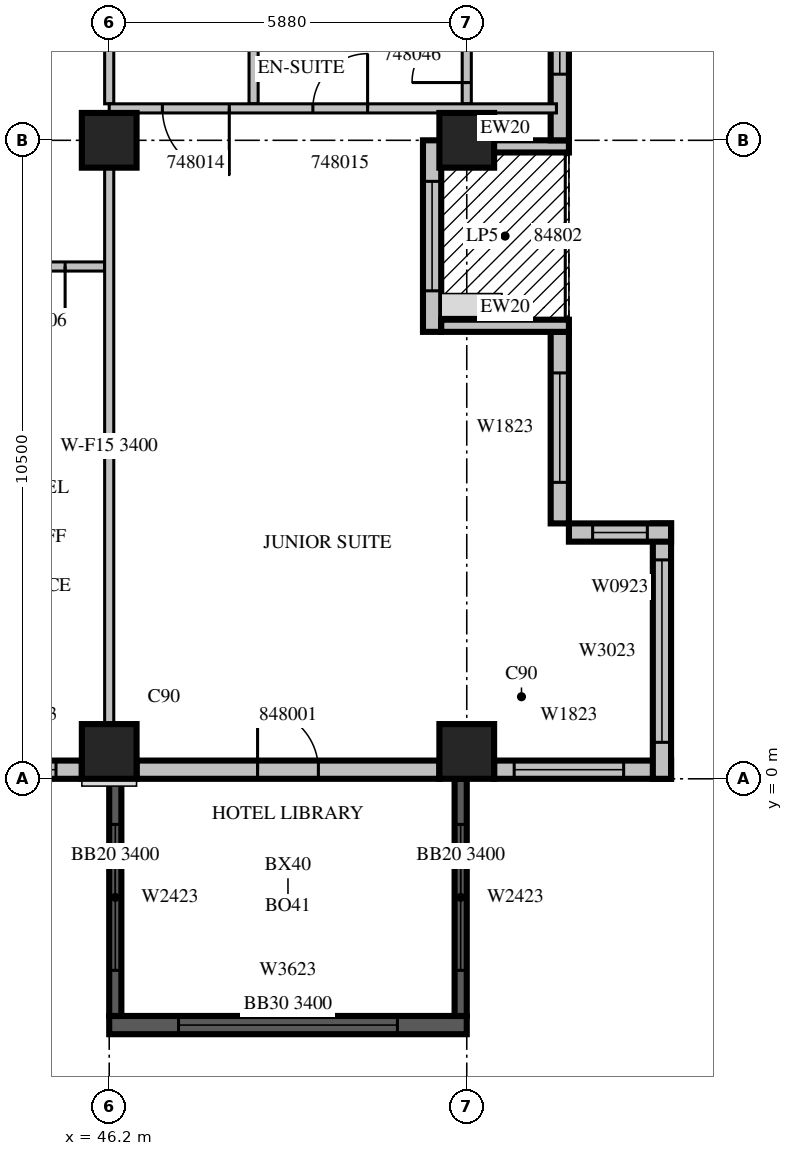
"""IFC4 building model, lengths in metres.
Left out: names, types, materials, properties, quantities, classifications, styles, units other than length and angle.
Written with IfcOpenShell. Run it as: python <this file> out.ifc"""

import sys

from ifc_helpers import new_model, si_unit, direction, frame, frame_2d, origin, origin_2d, place, context, subcontext, project, spatial, rectangle, extrude, source, transform, mapped, element, fill, save


model = new_model("IFC4")
c1 = context("Model", 3, precision=1e-05, world=origin(), true_north=direction((0.0, 1.0)))
c2 = subcontext(c1, "Body", "Model", "MODEL_VIEW")
j1 = project(units=[si_unit("LENGTHUNIT", "METRE"), si_unit("PLANEANGLEUNIT", "RADIAN")], contexts=[c1])
p1 = place(None, origin())
s1 = spatial("IfcSite", under=j1, at=p1, CompositionType="ELEMENT")
p2 = place(p1, origin())
s2 = spatial("IfcBuilding", under=s1, at=p2, CompositionType="ELEMENT")
p3 = place(p2, frame((0.0, 0.0, 215.8)))
s3 = spatial("IfcBuildingStorey", under=s2, at=p3, CompositionType="ELEMENT", Elevation=215.8)
m1 = source(origin(), c2, "Body", "SweptSolid", [
    extrude(rectangle(XDim=0.9, YDim=0.9, at=origin_2d()), origin(), (0.0, 0.0, 1.0), 3.8),
])
for number, where, z_axis, x_axis in (
    (1, (46.2, 0.45, 0.0), (0.0, 0.0, 1.0), (1.0, 0.0, 0.0)),
    (2, (52.08, 0.45, 0.0), (0.0, 0.0, 1.0), (1.0, 0.0, 0.0)),
    (3, (46.2, 10.5, 0.0), (0.0, 0.0, 1.0), (1.0, 0.0, 0.0)),
    (4, (52.08, 10.5, 0.0), (0.0, 0.0, 1.0), (1.0, 0.0, 0.0)),
):
    element("IfcColumn", number, at=place(p3, frame(where, z_axis=z_axis, x_axis=x_axis)), inside=s3, PredefinedType="COLUMN", context=c2, shape_type="MappedRepresentation", body=[
        mapped(m1, transform((0.0, 0.0, 0.0), scale=1.0)),
    ])
m2 = source(origin(), c2, "Body", "SweptSolid", [
    extrude(rectangle(XDim=5.88, YDim=0.3, at=frame_2d((2.94, 0.0))), origin(), (0.0, 0.0, 1.0), 3.4),
])
p4 = place(p3, frame((46.2, -4.05, 0.0), z_axis=(0.0, 0.0, 1.0), x_axis=(1.0, 0.0, 0.0)))
e5 = element("IfcWall", 5, at=p4, inside=s3, PredefinedType="SOLIDWALL", context=c2, shape_type="MappedRepresentation", body=[
    mapped(m2, transform((0.0, 0.0, 0.0), scale=1.0)),
])
m3 = source(origin(), c2, "Body", "SweptSolid", [
    extrude(rectangle(XDim=3.6, YDim=2.3, at=frame_2d((1.8, 1.15))), frame((0.0, 0.16, 0.0), z_axis=(0.0, -1.0, 0.0), x_axis=(1.0, 0.0, 0.0)), (0.0, 0.0, 1.0), 0.32),
])
p5 = place(p4, frame((1.14, 0.0, 0.6)))
e6 = element("IfcOpeningElement", 6, at=p5, cuts=e5, PredefinedType="OPENING", context=c2, shape_type="MappedRepresentation", body=[
    mapped(m3, transform((0.0, 0.0, 0.0), scale=1.0)),
])
m4 = source(origin(), c2, "Body", "SweptSolid", [
    extrude(rectangle(XDim=3.9, YDim=0.2, at=frame_2d((1.95, 0.0))), origin(), (0.0, 0.0, 1.0), 3.4),
])
p6 = place(p3, frame((46.3, 0.0, 0.0), z_axis=(0.0, 0.0, 1.0), x_axis=(0.0, -1.0, 0.0)))
e7 = element("IfcWall", 7, at=p6, inside=s3, PredefinedType="SOLIDWALL", context=c2, shape_type="MappedRepresentation", body=[
    mapped(m4, transform((0.0, 0.0, 0.0), scale=1.0)),
])
m5 = source(origin(), c2, "Body", "SweptSolid", [
    extrude(rectangle(XDim=2.4, YDim=2.3, at=frame_2d((1.2, 1.15))), frame((0.0, 0.11, 0.0), z_axis=(0.0, -1.0, 0.0), x_axis=(1.0, 0.0, 0.0)), (0.0, 0.0, 1.0), 0.22),
])
p7 = place(p6, frame((0.75, 0.0, 0.6)))
e8 = element("IfcOpeningElement", 8, at=p7, cuts=e7, PredefinedType="OPENING", context=c2, shape_type="MappedRepresentation", body=[
    mapped(m5, transform((0.0, 0.0, 0.0), scale=1.0)),
])
p8 = place(p3, frame((51.98, 0.0, 0.0), z_axis=(0.0, 0.0, 1.0), x_axis=(0.0, -1.0, 0.0)))
e9 = element("IfcWall", 9, at=p8, inside=s3, PredefinedType="SOLIDWALL", context=c2, shape_type="MappedRepresentation", body=[
    mapped(m4, transform((0.0, 0.0, 0.0), scale=1.0)),
])
p9 = place(p8, frame((0.75, 0.0, 0.6)))
e10 = element("IfcOpeningElement", 10, at=p9, cuts=e9, PredefinedType="OPENING", context=c2, shape_type="MappedRepresentation", body=[
    mapped(m5, transform((0.0, 0.0, 0.0), scale=1.0)),
])
m6 = source(origin(), c2, "Body", "SweptSolid", [
    extrude(rectangle(XDim=1.75, YDim=0.3, at=frame_2d((0.875, 0.0))), origin(), (0.0, 0.0, 1.0), 3.4),
])
p10 = place(p3, frame((44.0, 0.15, 0.0), z_axis=(0.0, 0.0, 1.0), x_axis=(1.0, 0.0, 0.0)))
e11 = element("IfcWall", 11, at=p10, inside=s3, PredefinedType="STANDARD", context=c2, shape_type="MappedRepresentation", body=[
    mapped(m6, transform((0.0, 0.0, 0.0), scale=1.0)),
])
m7 = source(origin(), c2, "Body", "SweptSolid", [
    extrude(rectangle(XDim=0.9, YDim=2.3, at=frame_2d((0.45, 1.15))), frame((0.0, 0.16, 0.0), z_axis=(0.0, -1.0, 0.0), x_axis=(1.0, 0.0, 0.0)), (0.0, 0.0, 1.0), 0.32),
])
p11 = place(p10, frame((0.425, 0.0, 0.6)))
e12 = element("IfcOpeningElement", 12, at=p11, cuts=e11, PredefinedType="OPENING", context=c2, shape_type="MappedRepresentation", body=[
    mapped(m7, transform((0.0, 0.0, 0.0), scale=1.0)),
])
m8 = source(origin(), c2, "Body", "SweptSolid", [
    extrude(rectangle(XDim=4.98, YDim=0.3, at=frame_2d((2.49, 0.0))), origin(), (0.0, 0.0, 1.0), 3.4),
])
p12 = place(p3, frame((46.65, 0.15, 0.0), z_axis=(0.0, 0.0, 1.0), x_axis=(1.0, 0.0, 0.0)))
e13 = element("IfcWall", 13, at=p12, inside=s3, PredefinedType="STANDARD", context=c2, shape_type="MappedRepresentation", body=[
    mapped(m8, transform((0.0, 0.0, 0.0), scale=1.0)),
])
m9 = source(origin(), c2, "Body", "SweptSolid", [
    extrude(rectangle(XDim=1.0, YDim=2.1, at=frame_2d((0.5, 1.05))), frame((0.0, 0.16, 0.0), z_axis=(0.0, -1.0, 0.0), x_axis=(1.0, 0.0, 0.0)), (0.0, 0.0, 1.0), 0.32),
])
p13 = place(p12, frame((1.99, 0.0, 0.0)))
e14 = element("IfcOpeningElement", 14, at=p13, cuts=e13, PredefinedType="OPENING", context=c2, shape_type="MappedRepresentation", body=[
    mapped(m9, transform((0.0, 0.0, 0.0), scale=1.0)),
])
m10 = source(origin(), c2, "Body", "SweptSolid", [
    extrude(rectangle(XDim=2.91, YDim=0.3, at=frame_2d((1.455, 0.0))), origin(), (0.0, 0.0, 1.0), 3.4),
])
p14 = place(p3, frame((52.53, 0.15, 0.0), z_axis=(0.0, 0.0, 1.0), x_axis=(1.0, 0.0, 0.0)))
e15 = element("IfcWall", 15, at=p14, inside=s3, PredefinedType="STANDARD", context=c2, shape_type="MappedRepresentation", body=[
    mapped(m10, transform((0.0, 0.0, 0.0), scale=1.0)),
])
m11 = source(origin(), c2, "Body", "SweptSolid", [
    extrude(rectangle(XDim=1.8, YDim=2.3, at=frame_2d((0.9, 1.15))), frame((0.0, 0.16, 0.0), z_axis=(0.0, -1.0, 0.0), x_axis=(1.0, 0.0, 0.0)), (0.0, 0.0, 1.0), 0.32),
])
p15 = place(p14, frame((0.33, 0.0, 0.6)))
e16 = element("IfcOpeningElement", 16, at=p15, cuts=e15, PredefinedType="OPENING", context=c2, shape_type="MappedRepresentation", body=[
    mapped(m11, transform((0.0, 0.0, 0.0), scale=1.0)),
])
m12 = source(origin(), c2, "Body", "SweptSolid", [
    extrude(rectangle(XDim=4.2, YDim=0.3, at=frame_2d((2.1, 0.0))), origin(), (0.0, 0.0, 1.0), 3.4),
])
p16 = place(p3, frame((55.29, 0.0, 0.0), z_axis=(0.0, 0.0, 1.0), x_axis=(0.0, 1.0, 0.0)))
e17 = element("IfcWall", 17, at=p16, inside=s3, PredefinedType="STANDARD", context=c2, shape_type="MappedRepresentation", body=[
    mapped(m12, transform((0.0, 0.0, 0.0), scale=1.0)),
])
m13 = source(origin(), c2, "Body", "SweptSolid", [
    extrude(rectangle(XDim=3.0, YDim=2.3, at=frame_2d((1.5, 1.15))), frame((0.0, 0.16, 0.0), z_axis=(0.0, -1.0, 0.0), x_axis=(1.0, 0.0, 0.0)), (0.0, 0.0, 1.0), 0.32),
])
p17 = place(p16, frame((0.6, 0.0, 0.6)))
e18 = element("IfcOpeningElement", 18, at=p17, cuts=e17, PredefinedType="OPENING", context=c2, shape_type="MappedRepresentation", body=[
    mapped(m13, transform((0.0, 0.0, 0.0), scale=1.0)),
])
m14 = source(origin(), c2, "Body", "SweptSolid", [
    extrude(rectangle(XDim=1.68, YDim=0.3, at=frame_2d((0.84, 0.0))), origin(), (0.0, 0.0, 1.0), 3.4),
])
p18 = place(p3, frame((55.44, 4.05, 0.0), z_axis=(0.0, 0.0, 1.0), x_axis=(-1.0, 0.0, 0.0)))
e19 = element("IfcWall", 19, at=p18, inside=s3, PredefinedType="STANDARD", context=c2, shape_type="MappedRepresentation", body=[
    mapped(m14, transform((0.0, 0.0, 0.0), scale=1.0)),
])
p19 = place(p18, frame((0.39, 0.0, 0.6)))
e20 = element("IfcOpeningElement", 20, at=p19, cuts=e19, PredefinedType="OPENING", context=c2, shape_type="MappedRepresentation", body=[
    mapped(m7, transform((0.0, 0.0, 0.0), scale=1.0)),
])
m15 = source(origin(), c2, "Body", "SweptSolid", [
    extrude(rectangle(XDim=3.15, YDim=0.3, at=frame_2d((1.575, 0.0))), origin(), (0.0, 0.0, 1.0), 3.4),
])
p20 = place(p3, frame((53.61, 4.2, 0.0), z_axis=(0.0, 0.0, 1.0), x_axis=(0.0, 1.0, 0.0)))
e21 = element("IfcWall", 21, at=p20, inside=s3, PredefinedType="STANDARD", context=c2, shape_type="MappedRepresentation", body=[
    mapped(m15, transform((0.0, 0.0, 0.0), scale=1.0)),
])
p21 = place(p20, frame((0.675, 0.0, 0.6)))
e22 = element("IfcOpeningElement", 22, at=p21, cuts=e21, PredefinedType="OPENING", context=c2, shape_type="MappedRepresentation", body=[
    mapped(m11, transform((0.0, 0.0, 0.0), scale=1.0)),
])
p22 = place(p3, frame((51.51, 7.35, 0.0), z_axis=(0.0, 0.0, 1.0), x_axis=(0.0, 1.0, 0.0)))
e23 = element("IfcWall", 23, at=p22, inside=s3, PredefinedType="STANDARD", context=c2, shape_type="MappedRepresentation", body=[
    mapped(m15, transform((0.0, 0.0, 0.0), scale=1.0)),
])
m16 = source(origin(), c2, "Body", "SweptSolid", [
    extrude(rectangle(XDim=1.8, YDim=2.4, at=frame_2d((0.9, 1.2))), frame((0.0, 0.16, 0.0), z_axis=(0.0, -1.0, 0.0), x_axis=(1.0, 0.0, 0.0)), (0.0, 0.0, 1.0), 0.32),
])
p23 = place(p22, frame((0.675, 0.0, 0.0)))
e24 = element("IfcOpeningElement", 24, at=p23, cuts=e23, PredefinedType="OPENING", context=c2, shape_type="MappedRepresentation", body=[
    mapped(m16, transform((0.0, 0.0, 0.0), scale=1.0)),
])
p24 = place(p3, frame((53.76, 7.45, 0.0), z_axis=(0.0, 0.0, 1.0), x_axis=(-1.0, 0.0, 0.0)))
e25 = element("IfcWall", 25, at=p24, inside=s3, PredefinedType="STANDARD", context=c2, shape_type="SweptSolid", body=[
    extrude(rectangle(XDim=2.1, YDim=0.2, at=frame_2d((1.05, 0.0))), origin(), (0.0, 0.0, 1.0), 3.4),
])
m17 = source(origin(), c2, "Body", "SweptSolid", [
    extrude(rectangle(XDim=2.1, YDim=0.2, at=frame_2d((1.05, 0.0))), origin(), (0.0, 0.0, 1.0), 3.4),
])
p25 = place(p3, frame((53.76, 10.4, 0.0), z_axis=(0.0, 0.0, 1.0), x_axis=(-1.0, 0.0, 0.0)))
e26 = element("IfcWall", 26, at=p25, inside=s3, PredefinedType="STANDARD", context=c2, shape_type="MappedRepresentation", body=[
    mapped(m17, transform((0.0, 0.0, 0.0), scale=1.0)),
])
m18 = source(origin(), c2, "Body", "SweptSolid", [
    extrude(rectangle(XDim=6.75, YDim=0.3, at=frame_2d((3.375, 0.0))), origin(), (0.0, 0.0, 1.0), 3.4),
])
p26 = place(p3, frame((53.61, 10.5, 0.0), z_axis=(0.0, 0.0, 1.0), x_axis=(0.0, 1.0, 0.0)))
e27 = element("IfcWall", 27, at=p26, inside=s3, PredefinedType="STANDARD", context=c2, shape_type="MappedRepresentation", body=[
    mapped(m18, transform((0.0, 0.0, 0.0), scale=1.0)),
])
m19 = source(origin(), c2, "Body", "SweptSolid", [
    extrude(rectangle(XDim=1.2, YDim=2.3, at=frame_2d((0.6, 1.15))), frame((0.0, 0.16, 0.0), z_axis=(0.0, -1.0, 0.0), x_axis=(1.0, 0.0, 0.0)), (0.0, 0.0, 1.0), 0.32),
])
p27 = place(p26, frame((1.087, 0.0, 0.6)))
e28 = element("IfcOpeningElement", 28, at=p27, cuts=e27, PredefinedType="OPENING", context=c2, shape_type="MappedRepresentation", body=[
    mapped(m19, transform((0.0, 0.0, 0.0), scale=1.0)),
])
p28 = place(p26, frame((4.606, 0.0, 0.6)))
e29 = element("IfcOpeningElement", 29, at=p28, cuts=e27, PredefinedType="OPENING", context=c2, shape_type="MappedRepresentation", body=[
    mapped(m19, transform((0.0, 0.0, 0.0), scale=1.0)),
])
m20 = source(origin(), c2, "Body", "SweptSolid", [
    extrude(rectangle(XDim=2.2, YDim=0.15, at=frame_2d((1.1, 0.0))), origin(), (0.0, 0.0, 1.0), 3.4),
])
p29 = place(p3, frame((46.125, 8.425, 0.0), z_axis=(0.0, 0.0, 1.0), x_axis=(-1.0, 0.0, 0.0)))
e30 = element("IfcWall", 30, at=p29, inside=s3, PredefinedType="PARTITIONING", context=c2, shape_type="MappedRepresentation", body=[
    mapped(m20, transform((0.0, 0.0, 0.0), scale=1.0)),
])
m21 = source(origin(), c2, "Body", "SweptSolid", [
    extrude(rectangle(XDim=0.9, YDim=2.1, at=frame_2d((0.45, 1.05))), frame((0.0, 0.085, 0.0), z_axis=(0.0, -1.0, 0.0), x_axis=(1.0, 0.0, 0.0)), (0.0, 0.0, 1.0), 0.17),
])
p30 = place(p29, frame((0.65, 0.0, 0.0)))
e31 = element("IfcOpeningElement", 31, at=p30, cuts=e30, PredefinedType="OPENING", context=c2, shape_type="MappedRepresentation", body=[
    mapped(m21, transform((0.0, 0.0, 0.0), scale=1.0)),
])
m22 = source(origin(), c2, "Body", "SweptSolid", [
    extrude(rectangle(XDim=3.6, YDim=0.15, at=frame_2d((1.8, 0.0))), origin(), (0.0, 0.0, 1.0), 3.4),
])
p31 = place(p3, frame((48.574, 11.1, 0.0), z_axis=(0.0, 0.0, 1.0), x_axis=(0.0, 1.0, 0.0)))
e32 = element("IfcWall", 32, at=p31, inside=s3, PredefinedType="PARTITIONING", context=c2, shape_type="MappedRepresentation", body=[
    mapped(m22, transform((0.0, 0.0, 0.0), scale=1.0)),
])
p32 = place(p3, frame((52.08, 11.1, 0.0), z_axis=(0.0, 0.0, 1.0), x_axis=(0.0, 1.0, 0.0)))
e33 = element("IfcWall", 33, at=p32, inside=s3, PredefinedType="PARTITIONING", context=c2, shape_type="MappedRepresentation", body=[
    mapped(m22, transform((0.0, 0.0, 0.0), scale=1.0)),
])
p33 = place(p32, frame((1.35, 0.0, 0.0)))
e34 = element("IfcOpeningElement", 34, at=p33, cuts=e33, PredefinedType="OPENING", context=c2, shape_type="MappedRepresentation", body=[
    mapped(m21, transform((0.0, 0.0, 0.0), scale=1.0)),
])
p34 = place(p32, frame((2.35, 0.0, 0.0)))
e35 = element("IfcOpeningElement", 35, at=p34, cuts=e33, PredefinedType="OPENING", context=c2, shape_type="MappedRepresentation", body=[
    mapped(m21, transform((0.0, 0.0, 0.0), scale=1.0)),
])
p35 = place(p32, frame((0.35, 0.0, 0.0)))
e36 = element("IfcOpeningElement", 36, at=p35, cuts=e33, PredefinedType="OPENING", context=c2, shape_type="MappedRepresentation", body=[
    mapped(m21, transform((0.0, 0.0, 0.0), scale=1.0)),
])
m23 = source(origin(), c2, "Body", "SweptSolid", [
    extrude(rectangle(XDim=9.152, YDim=0.15, at=frame_2d((4.576, 0.0))), origin(), (0.0, 0.0, 1.0), 3.4),
])
p36 = place(p3, frame((46.2, 0.899, 0.0), z_axis=(0.0, 0.0, 1.0), x_axis=(0.0, 1.0, 0.0)))
e37 = element("IfcWall", 37, at=p36, inside=s3, PredefinedType="PARTITIONING", context=c2, shape_type="MappedRepresentation", body=[
    mapped(m23, transform((0.0, 0.0, 0.0), scale=1.0)),
])
p37 = place(p3, frame((46.2, 11.1, 0.0), z_axis=(0.0, 0.0, 1.0), x_axis=(0.0, 1.0, 0.0)))
e38 = element("IfcWall", 38, at=p37, inside=s3, PredefinedType="PARTITIONING", context=c2, shape_type="MappedRepresentation", body=[
    mapped(m22, transform((0.0, 0.0, 0.0), scale=1.0)),
])
m24 = source(origin(), c2, "Body", "SweptSolid", [
    extrude(rectangle(XDim=7.355, YDim=0.15, at=frame_2d((3.678, 0.0))), origin(), (0.0, 0.0, 1.0), 3.4),
])
p38 = place(p3, frame((53.555, 11.025, 0.0), z_axis=(0.0, 0.0, 1.0), x_axis=(-1.0, 0.0, 0.0)))
e39 = element("IfcWall", 39, at=p38, inside=s3, PredefinedType="PARTITIONING", context=c2, shape_type="MappedRepresentation", body=[
    mapped(m24, transform((0.0, 0.0, 0.0), scale=1.0)),
])
m25 = source(origin(), c2, "Body", "SweptSolid", [
    extrude(rectangle(XDim=1.1, YDim=2.1, at=frame_2d((0.55, 1.05))), frame((0.0, 0.085, 0.0), z_axis=(0.0, -1.0, 0.0), x_axis=(1.0, 0.0, 0.0)), (0.0, 0.0, 1.0), 0.17),
])
p39 = place(p38, frame((5.38, 0.0, 0.0)))
e40 = element("IfcOpeningElement", 40, at=p39, cuts=e39, PredefinedType="OPENING", context=c2, shape_type="MappedRepresentation", body=[
    mapped(m25, transform((0.0, 0.0, 0.0), scale=1.0)),
])
p40 = place(p38, frame((3.106, 0.0, 0.0)))
e41 = element("IfcOpeningElement", 41, at=p40, cuts=e39, PredefinedType="OPENING", context=c2, shape_type="MappedRepresentation", body=[
    mapped(m21, transform((0.0, 0.0, 0.0), scale=1.0)),
])
m26 = source(origin(), c2, "Body", "SweptSolid", [
    extrude(rectangle(XDim=3.6, YDim=2.3, at=frame_2d((1.8, 1.15))), frame((0.0, 0.03, 0.0), z_axis=(0.0, -1.0, 0.0), x_axis=(1.0, 0.0, 0.0)), (0.0, 0.0, 1.0), 0.06),
])
p41 = place(p5, origin())
e42 = element("IfcWindow", 42, at=p41, inside=s3, PartitioningType="SINGLE_PANEL", PredefinedType="WINDOW", context=c2, shape_type="MappedRepresentation", body=[
    mapped(m26, transform((0.0, 0.0, 0.0), scale=1.0)),
])
fill(e6, e42)
m27 = source(origin(), c2, "Body", "SweptSolid", [
    extrude(rectangle(XDim=2.4, YDim=2.3, at=frame_2d((1.2, 1.15))), frame((0.0, 0.03, 0.0), z_axis=(0.0, -1.0, 0.0), x_axis=(1.0, 0.0, 0.0)), (0.0, 0.0, 1.0), 0.06),
])
p42 = place(p7, origin())
e43 = element("IfcWindow", 43, at=p42, inside=s3, PartitioningType="SINGLE_PANEL", PredefinedType="WINDOW", context=c2, shape_type="MappedRepresentation", body=[
    mapped(m27, transform((0.0, 0.0, 0.0), scale=1.0)),
])
fill(e8, e43)
p43 = place(p9, origin())
e44 = element("IfcWindow", 44, at=p43, inside=s3, PartitioningType="SINGLE_PANEL", PredefinedType="WINDOW", context=c2, shape_type="MappedRepresentation", body=[
    mapped(m27, transform((0.0, 0.0, 0.0), scale=1.0)),
])
fill(e10, e44)
m28 = source(origin(), c2, "Body", "SweptSolid", [
    extrude(rectangle(XDim=0.9, YDim=2.3, at=frame_2d((0.45, 1.15))), frame((0.0, 0.03, 0.0), z_axis=(0.0, -1.0, 0.0), x_axis=(1.0, 0.0, 0.0)), (0.0, 0.0, 1.0), 0.06),
])
p44 = place(p11, origin())
e45 = element("IfcWindow", 45, at=p44, inside=s3, PartitioningType="SINGLE_PANEL", PredefinedType="WINDOW", context=c2, shape_type="MappedRepresentation", body=[
    mapped(m28, transform((0.0, 0.0, 0.0), scale=1.0)),
])
fill(e12, e45)
m29 = source(origin(), c2, "Body", "SweptSolid", [
    extrude(rectangle(XDim=1.8, YDim=2.3, at=frame_2d((0.9, 1.15))), frame((0.0, 0.03, 0.0), z_axis=(0.0, -1.0, 0.0), x_axis=(1.0, 0.0, 0.0)), (0.0, 0.0, 1.0), 0.06),
])
p45 = place(p15, origin())
e46 = element("IfcWindow", 46, at=p45, inside=s3, PartitioningType="SINGLE_PANEL", PredefinedType="WINDOW", context=c2, shape_type="MappedRepresentation", body=[
    mapped(m29, transform((0.0, 0.0, 0.0), scale=1.0)),
])
fill(e16, e46)
m30 = source(origin(), c2, "Body", "SweptSolid", [
    extrude(rectangle(XDim=3.0, YDim=2.3, at=frame_2d((1.5, 1.15))), frame((0.0, 0.03, 0.0), z_axis=(0.0, -1.0, 0.0), x_axis=(1.0, 0.0, 0.0)), (0.0, 0.0, 1.0), 0.06),
])
p46 = place(p17, origin())
e47 = element("IfcWindow", 47, at=p46, inside=s3, PartitioningType="SINGLE_PANEL", PredefinedType="WINDOW", context=c2, shape_type="MappedRepresentation", body=[
    mapped(m30, transform((0.0, 0.0, 0.0), scale=1.0)),
])
fill(e18, e47)
p47 = place(p19, origin())
e48 = element("IfcWindow", 48, at=p47, inside=s3, PartitioningType="SINGLE_PANEL", PredefinedType="WINDOW", context=c2, shape_type="MappedRepresentation", body=[
    mapped(m28, transform((0.0, 0.0, 0.0), scale=1.0)),
])
fill(e20, e48)
p48 = place(p21, origin())
e49 = element("IfcWindow", 49, at=p48, inside=s3, PartitioningType="SINGLE_PANEL", PredefinedType="WINDOW", context=c2, shape_type="MappedRepresentation", body=[
    mapped(m29, transform((0.0, 0.0, 0.0), scale=1.0)),
])
fill(e22, e49)
m31 = source(origin(), c2, "Body", "SweptSolid", [
    extrude(rectangle(XDim=1.8, YDim=2.4, at=frame_2d((0.9, 1.2))), frame((0.0, 0.025, 0.0), z_axis=(0.0, -1.0, 0.0), x_axis=(1.0, 0.0, 0.0)), (0.0, 0.0, 1.0), 0.05),
])
p49 = place(p23, origin())
e50 = element("IfcDoor", 50, at=p49, inside=s3, OperationType="SLIDING_TO_LEFT", PredefinedType="DOOR", context=c2, shape_type="MappedRepresentation", body=[
    mapped(m31, transform((0.0, 0.0, 0.0), scale=1.0)),
])
fill(e24, e50)
m32 = source(origin(), c2, "Body", "SweptSolid", [
    extrude(rectangle(XDim=1.2, YDim=2.3, at=frame_2d((0.6, 1.15))), frame((0.0, 0.03, 0.0), z_axis=(0.0, -1.0, 0.0), x_axis=(1.0, 0.0, 0.0)), (0.0, 0.0, 1.0), 0.06),
])
p50 = place(p27, origin())
e51 = element("IfcWindow", 51, at=p50, inside=s3, PartitioningType="SINGLE_PANEL", PredefinedType="WINDOW", context=c2, shape_type="MappedRepresentation", body=[
    mapped(m32, transform((0.0, 0.0, 0.0), scale=1.0)),
])
fill(e28, e51)
m33 = source(origin(), c2, "Body", "SweptSolid", [
    extrude(rectangle(XDim=0.9, YDim=2.1, at=frame_2d((0.45, 1.05))), frame((0.0, 0.025, 0.0), z_axis=(0.0, -1.0, 0.0), x_axis=(1.0, 0.0, 0.0)), (0.0, 0.0, 1.0), 0.05),
])
p51 = place(p30, origin())
e52 = element("IfcDoor", 52, at=p51, inside=s3, OperationType="SINGLE_SWING_LEFT", PredefinedType="DOOR", context=c2, shape_type="MappedRepresentation", body=[
    mapped(m33, transform((0.0, 0.0, 0.0), scale=1.0)),
])
fill(e31, e52)
m34 = source(origin(), c2, "Body", "SweptSolid", [
    extrude(rectangle(XDim=1.1, YDim=2.1, at=frame_2d((0.55, 1.05))), frame((0.0, 0.025, 0.0), z_axis=(0.0, -1.0, 0.0), x_axis=(1.0, 0.0, 0.0)), (0.0, 0.0, 1.0), 0.05),
])
p52 = place(p39, origin())
e53 = element("IfcDoor", 53, at=p52, inside=s3, OperationType="SINGLE_SWING_LEFT", PredefinedType="DOOR", context=c2, shape_type="MappedRepresentation", body=[
    mapped(m34, transform((0.0, 0.0, 0.0), scale=1.0)),
])
fill(e40, e53)
p53 = place(p40, origin())
e54 = element("IfcDoor", 54, at=p53, inside=s3, OperationType="SINGLE_SWING_RIGHT", PredefinedType="DOOR", context=c2, shape_type="MappedRepresentation", body=[
    mapped(m33, transform((0.0, 0.0, 0.0), scale=1.0)),
])
fill(e41, e54)
p54 = place(p35, origin())
e55 = element("IfcDoor", 55, at=p54, inside=s3, OperationType="SINGLE_SWING_LEFT", PredefinedType="DOOR", context=c2, shape_type="MappedRepresentation", body=[
    mapped(m33, transform((0.0, 0.0, 0.0), scale=1.0)),
])
fill(e36, e55)
m35 = source(origin(), c2, "Body", "SweptSolid", [
    extrude(rectangle(XDim=1.0, YDim=2.1, at=frame_2d((0.5, 1.05))), frame((0.0, 0.025, 0.0), z_axis=(0.0, -1.0, 0.0), x_axis=(1.0, 0.0, 0.0)), (0.0, 0.0, 1.0), 0.05),
])
p55 = place(p13, origin())
e56 = element("IfcDoor", 56, at=p55, inside=s3, OperationType="SINGLE_SWING_LEFT", PredefinedType="DOOR", context=c2, shape_type="MappedRepresentation", body=[
    mapped(m35, transform((0.0, 0.0, 0.0), scale=1.0)),
])
fill(e14, e56)
save(model, sys.argv[1])
